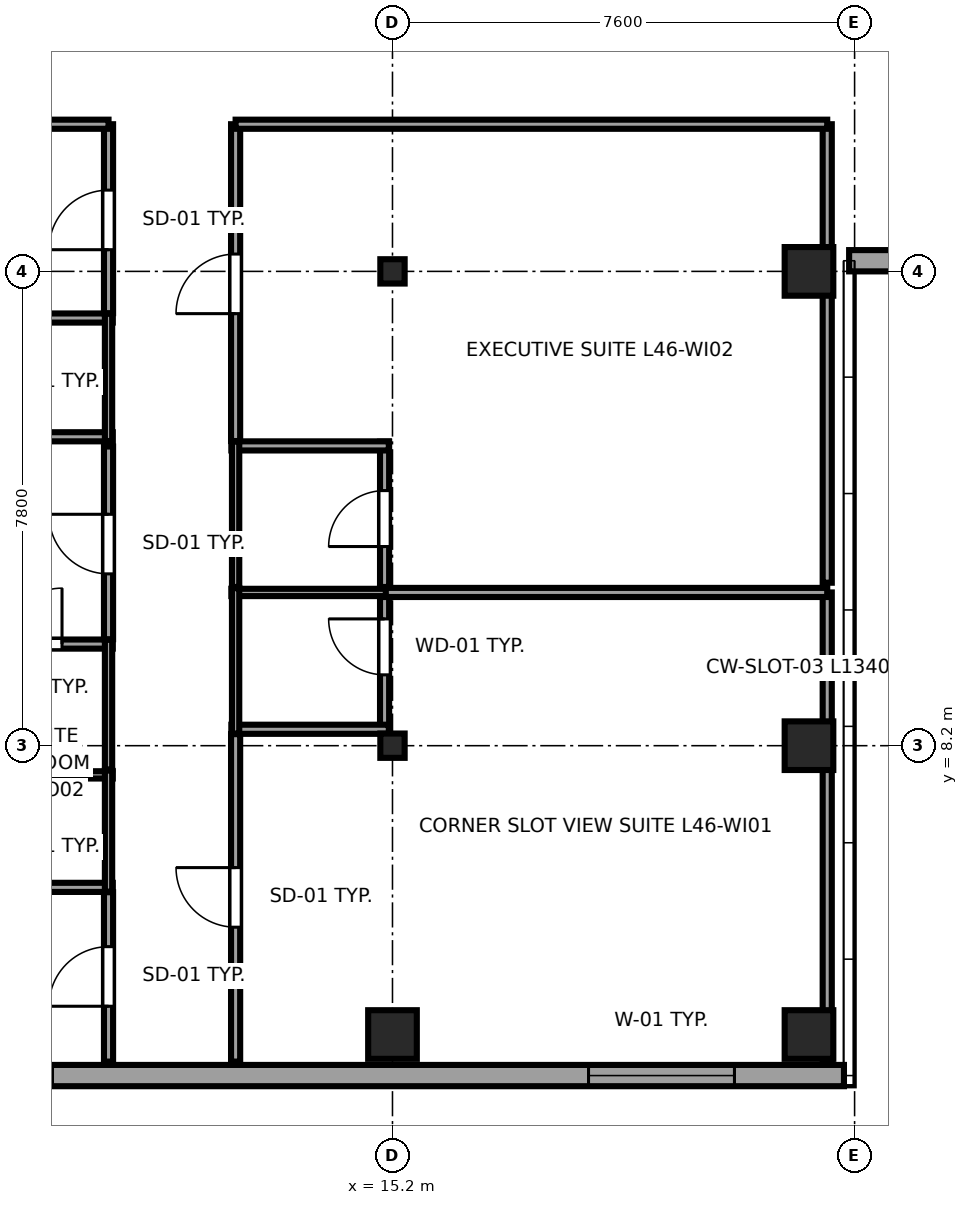
"""IFC4 building model, lengths in metres.
Left out: names, types, materials, properties, quantities, classifications, styles, units other than length and angle.
Written with IfcOpenShell. Run it as: python <this file> out.ifc"""

import sys

from ifc_helpers import new_model, si_unit, direction, frame, frame_2d, origin, origin_2d, place, context, subcontext, project, spatial, rectangle, i_section, extrude, source, transform, mapped, element, fill, save


model = new_model("IFC4")
c1 = context("Model", 3, precision=1e-05, world=origin(), true_north=direction((0.0, 1.0)))
c2 = subcontext(c1, "Body", "Model", "MODEL_VIEW")
j1 = project(units=[si_unit("LENGTHUNIT", "METRE"), si_unit("PLANEANGLEUNIT", "RADIAN")], contexts=[c1])
p1 = place(None, origin())
s1 = spatial("IfcSite", under=j1, at=p1, CompositionType="ELEMENT")
p2 = place(p1, origin())
s2 = spatial("IfcBuilding", under=s1, at=p2, CompositionType="ELEMENT")
p3 = place(p2, frame((0.0, 0.0, 175.45)))
s3 = spatial("IfcBuildingStorey", under=s2, at=p3, CompositionType="ELEMENT", Elevation=175.45)
m1 = source(origin(), c2, "Body", "SweptSolid", [
    extrude(rectangle(XDim=0.8, YDim=0.8, at=origin_2d()), origin(), (0.0, 0.0, 1.0), 3.55),
])
p4 = place(p3, frame((15.2, 3.45, 0.0), z_axis=(0.0, 0.0, 1.0), x_axis=(1.0, 0.0, 0.0)))
e1 = element("IfcColumn", 1, at=p4, inside=s3, PredefinedType="COLUMN", context=c2, shape_type="MappedRepresentation", body=[
    mapped(m1, transform((0.0, 0.0, 0.0), x_axis=(1.0, 0.0, 0.0), y_axis=(0.0, 1.0, 0.0), z_axis=(0.0, 0.0, 1.0), scale=1.0)),
])
m2 = source(origin(), c2, "Body", "SweptSolid", [
    extrude(i_section(OverallWidth=0.4, OverallDepth=0.4, WebThickness=0.02, FlangeThickness=0.035, at=origin_2d()), origin(), (0.0, 0.0, 1.0), 3.55),
])
for number, where, z_axis, x_axis in (
    (2, (15.2, 8.2, 0.0), (0.0, 0.0, 1.0), (1.0, 0.0, 0.0)),
    (3, (15.2, 16.0, 0.0), (0.0, 0.0, 1.0), (1.0, 0.0, 0.0)),
):
    element("IfcColumn", number, at=place(p3, frame(where, z_axis=z_axis, x_axis=x_axis)), inside=s3, PredefinedType="COLUMN", context=c2, shape_type="MappedRepresentation", body=[
        mapped(m2, transform((0.0, 0.0, 0.0), x_axis=(1.0, 0.0, 0.0), y_axis=(0.0, 1.0, 0.0), z_axis=(0.0, 0.0, 1.0), scale=1.0)),
    ])
for number, where, z_axis, x_axis in (
    (4, (22.05, 3.45, 0.0), (0.0, 0.0, 1.0), (1.0, 0.0, 0.0)),
    (5, (22.05, 8.2, 0.0), (0.0, 0.0, 1.0), (1.0, 0.0, 0.0)),
    (6, (22.05, 16.0, 0.0), (0.0, 0.0, 1.0), (1.0, 0.0, 0.0)),
):
    element("IfcColumn", number, at=place(p3, frame(where, z_axis=z_axis, x_axis=x_axis)), inside=s3, PredefinedType="COLUMN", context=c2, shape_type="MappedRepresentation", body=[
        mapped(m1, transform((0.0, 0.0, 0.0), x_axis=(1.0, 0.0, 0.0), y_axis=(0.0, 1.0, 0.0), z_axis=(0.0, 0.0, 1.0), scale=1.0)),
    ])
p5 = place(p3, frame((7.017, 2.775, 0.0), z_axis=(0.0, 0.0, 1.0), x_axis=(1.0, 0.0, 0.0)))
e7 = element("IfcWall", 7, at=p5, inside=s3, PredefinedType="SOLIDWALL", context=c2, shape_type="SweptSolid", body=[
    extrude(rectangle(XDim=15.608, YDim=0.35, at=frame_2d((7.804, 0.0))), origin(), (0.0, 0.0, 1.0), 3.37),
])
p6 = place(p5, frame((11.407, 0.0, 0.68)))
e8 = element("IfcOpeningElement", 8, at=p6, cuts=e7, PredefinedType="OPENING", context=c2, shape_type="SweptSolid", body=[
    extrude(rectangle(XDim=2.4, YDim=1.9, at=frame_2d((1.2, 0.95))), frame((0.0, 0.185, 0.0), z_axis=(0.0, -1.0, 0.0), x_axis=(1.0, 0.0, 0.0)), (0.0, 0.0, 1.0), 0.37),
])
p7 = place(p5, frame((1.091, 0.0, 0.62)))
e9 = element("IfcOpeningElement", 9, at=p7, cuts=e7, PredefinedType="OPENING", context=c2, shape_type="SweptSolid", body=[
    extrude(rectangle(XDim=1.5, YDim=1.55, at=frame_2d((0.75, 0.775))), frame((0.0, 0.185, 0.0), z_axis=(0.0, -1.0, 0.0), x_axis=(1.0, 0.0, 0.0)), (0.0, 0.0, 1.0), 0.37),
])
p8 = place(p3, frame((22.71, 16.175, 0.0), z_axis=(0.0, 0.0, 1.0), x_axis=(1.0, 0.0, 0.0)))
e10 = element("IfcWall", 10, at=p8, inside=s3, PredefinedType="SOLIDWALL", context=c2, shape_type="SweptSolid", body=[
    extrude(rectangle(XDim=11.58, YDim=0.35, at=frame_2d((5.79, 0.0))), origin(), (0.0, 0.0, 1.0), 2.758),
])
p9 = place(p8, frame((1.995, 0.0, 0.68)))
e11 = element("IfcOpeningElement", 11, at=p9, cuts=e10, PredefinedType="OPENING", context=c2, shape_type="SweptSolid", body=[
    extrude(rectangle(XDim=2.4, YDim=1.9, at=frame_2d((1.2, 0.95))), frame((0.0, 0.185, 0.0), z_axis=(0.0, -1.0, 0.0), x_axis=(1.0, 0.0, 0.0)), (0.0, 0.0, 1.0), 0.37),
])
p10 = place(p8, frame((7.185, 0.0, 0.68)))
e12 = element("IfcOpeningElement", 12, at=p10, cuts=e10, PredefinedType="OPENING", context=c2, shape_type="SweptSolid", body=[
    extrude(rectangle(XDim=2.4, YDim=1.9, at=frame_2d((1.2, 0.95))), frame((0.0, 0.185, 0.0), z_axis=(0.0, -1.0, 0.0), x_axis=(1.0, 0.0, 0.0)), (0.0, 0.0, 1.0), 0.37),
])
p11 = place(p3, frame((8.01, 5.87, 0.0), z_axis=(0.0, 0.0, 1.0), x_axis=(1.0, 0.0, 0.0)))
e13 = element("IfcWall", 13, at=p11, inside=s3, PredefinedType="PARTITIONING", context=c2, shape_type="SweptSolid", body=[
    extrude(rectangle(XDim=2.59, YDim=0.15, at=frame_2d((1.295, 0.0))), origin(), (0.0, 0.0, 1.0), 3.37),
])
p12 = place(p3, frame((8.01, 7.72, 0.0), z_axis=(0.0, 0.0, 1.0), x_axis=(1.0, 0.0, 0.0)))
e14 = element("IfcWall", 14, at=p12, inside=s3, PredefinedType="PLUMBINGWALL", context=c2, shape_type="SweptSolid", body=[
    extrude(rectangle(XDim=2.59, YDim=0.12, at=frame_2d((1.295, 0.0))), origin(), (0.0, 0.0, 1.0), 3.37),
])
p13 = place(p3, frame((10.53, 5.8, 0.0), z_axis=(0.0, 0.0, 1.0), x_axis=(0.0, 1.0, 0.0)))
e15 = element("IfcWall", 15, at=p13, inside=s3, PredefinedType="PLUMBINGWALL", context=c2, shape_type="SweptSolid", body=[
    extrude(rectangle(XDim=1.99, YDim=0.12, at=frame_2d((0.995, 0.0))), origin(), (0.0, 0.0, 1.0), 3.37),
])
p14 = place(p3, frame((8.01, 9.871, 0.0), z_axis=(0.0, 0.0, 1.0), x_axis=(1.0, 0.0, 0.0)))
e16 = element("IfcWall", 16, at=p14, inside=s3, PredefinedType="PARTITIONING", context=c2, shape_type="SweptSolid", body=[
    extrude(rectangle(XDim=2.59, YDim=0.15, at=frame_2d((1.295, 0.0))), origin(), (0.0, 0.0, 1.0), 3.37),
])
p15 = place(p14, frame((0.835, 0.0, 0.0)))
e17 = element("IfcOpeningElement", 17, at=p15, cuts=e16, PredefinedType="OPENING", context=c2, shape_type="SweptSolid", body=[
    extrude(rectangle(XDim=0.92, YDim=2.01, at=frame_2d((0.46, 1.005))), frame((0.0, 0.085, 0.0), z_axis=(0.0, -1.0, 0.0), x_axis=(1.0, 0.0, 0.0)), (0.0, 0.0, 1.0), 0.17),
])
p16 = place(p3, frame((10.53, 7.81, 0.0), z_axis=(0.0, 0.0, 1.0), x_axis=(0.0, 1.0, 0.0)))
e18 = element("IfcWall", 18, at=p16, inside=s3, PredefinedType="PLUMBINGWALL", context=c2, shape_type="SweptSolid", body=[
    extrude(rectangle(XDim=2.131, YDim=0.12, at=frame_2d((1.065, 0.0))), origin(), (0.0, 0.0, 1.0), 3.37),
])
p17 = place(p3, frame((3.005, 13.28, 0.0), z_axis=(0.0, 0.0, 1.0), x_axis=(1.0, 0.0, 0.0)))
e19 = element("IfcWall", 19, at=p17, inside=s3, PredefinedType="PARTITIONING", context=c2, shape_type="SweptSolid", body=[
    extrude(rectangle(XDim=7.595, YDim=0.15, at=frame_2d((3.798, 0.0))), origin(), (0.0, 0.0, 1.0), 3.37),
])
p18 = place(p3, frame((8.01, 15.233, 0.0), z_axis=(0.0, 0.0, 1.0), x_axis=(1.0, 0.0, 0.0)))
e20 = element("IfcWall", 20, at=p18, inside=s3, PredefinedType="PARTITIONING", context=c2, shape_type="SweptSolid", body=[
    extrude(rectangle(XDim=2.59, YDim=0.15, at=frame_2d((1.295, 0.0))), origin(), (0.0, 0.0, 1.0), 3.37),
])
p19 = place(p3, frame((10.53, 13.21, 0.0), z_axis=(0.0, 0.0, 1.0), x_axis=(0.0, 1.0, 0.0)))
e21 = element("IfcWall", 21, at=p19, inside=s3, PredefinedType="PLUMBINGWALL", context=c2, shape_type="SweptSolid", body=[
    extrude(rectangle(XDim=2.093, YDim=0.12, at=frame_2d((1.046, 0.0))), origin(), (0.0, 0.0, 1.0), 3.37),
])
p20 = place(p3, frame((15.07, 8.4, 0.0), z_axis=(0.0, 0.0, 1.0), x_axis=(0.0, 1.0, 0.0)))
e22 = element("IfcWall", 22, at=p20, inside=s3, PredefinedType="PARTITIONING", context=c2, shape_type="SweptSolid", body=[
    extrude(rectangle(XDim=2.39, YDim=0.15, at=frame_2d((1.195, 0.0))), origin(), (0.0, 0.0, 1.0), 2.827),
])
p21 = place(p20, frame((0.965, 0.0, 0.0)))
e23 = element("IfcOpeningElement", 23, at=p21, cuts=e22, PredefinedType="OPENING", context=c2, shape_type="SweptSolid", body=[
    extrude(rectangle(XDim=0.92, YDim=2.01, at=frame_2d((0.46, 1.005))), frame((0.0, 0.085, 0.0), z_axis=(0.0, -1.0, 0.0), x_axis=(1.0, 0.0, 0.0)), (0.0, 0.0, 1.0), 0.17),
])
p22 = place(p3, frame((12.55, 8.47, 0.0), z_axis=(0.0, 0.0, 1.0), x_axis=(1.0, 0.0, 0.0)))
e24 = element("IfcWall", 24, at=p22, inside=s3, PredefinedType="PARTITIONING", context=c2, shape_type="SweptSolid", body=[
    extrude(rectangle(XDim=2.59, YDim=0.15, at=frame_2d((1.295, 0.0))), origin(), (0.0, 0.0, 1.0), 3.37),
])
p23 = place(p3, frame((12.55, 10.72, 0.0), z_axis=(0.0, 0.0, 1.0), x_axis=(1.0, 0.0, 0.0)))
e25 = element("IfcWall", 25, at=p23, inside=s3, PredefinedType="PLUMBINGWALL", context=c2, shape_type="SweptSolid", body=[
    extrude(rectangle(XDim=2.59, YDim=0.12, at=frame_2d((1.295, 0.0))), origin(), (0.0, 0.0, 1.0), 3.37),
])
p24 = place(p3, frame((12.62, 8.4, 0.0), z_axis=(0.0, 0.0, 1.0), x_axis=(0.0, 1.0, 0.0)))
e26 = element("IfcWall", 26, at=p24, inside=s3, PredefinedType="PLUMBINGWALL", context=c2, shape_type="SweptSolid", body=[
    extrude(rectangle(XDim=2.39, YDim=0.12, at=frame_2d((1.195, 0.0))), origin(), (0.0, 0.0, 1.0), 3.37),
])
p25 = place(p3, frame((15.07, 10.81, 0.0), z_axis=(0.0, 0.0, 1.0), x_axis=(0.0, 1.0, 0.0)))
e27 = element("IfcWall", 27, at=p25, inside=s3, PredefinedType="PARTITIONING", context=c2, shape_type="SweptSolid", body=[
    extrude(rectangle(XDim=2.39, YDim=0.15, at=frame_2d((1.195, 0.0))), origin(), (0.0, 0.0, 1.0), 2.827),
])
p26 = place(p25, frame((0.665, 0.0, 0.0)))
e28 = element("IfcOpeningElement", 28, at=p26, cuts=e27, PredefinedType="OPENING", context=c2, shape_type="SweptSolid", body=[
    extrude(rectangle(XDim=0.92, YDim=2.01, at=frame_2d((0.46, 1.005))), frame((0.0, 0.085, 0.0), z_axis=(0.0, -1.0, 0.0), x_axis=(1.0, 0.0, 0.0)), (0.0, 0.0, 1.0), 0.17),
])
p27 = place(p3, frame((12.55, 13.13, 0.0), z_axis=(0.0, 0.0, 1.0), x_axis=(1.0, 0.0, 0.0)))
e29 = element("IfcWall", 29, at=p27, inside=s3, PredefinedType="PARTITIONING", context=c2, shape_type="SweptSolid", body=[
    extrude(rectangle(XDim=2.59, YDim=0.15, at=frame_2d((1.295, 0.0))), origin(), (0.0, 0.0, 1.0), 3.37),
])
p28 = place(p3, frame((12.62, 10.81, 0.0), z_axis=(0.0, 0.0, 1.0), x_axis=(0.0, 1.0, 0.0)))
e30 = element("IfcWall", 30, at=p28, inside=s3, PredefinedType="PLUMBINGWALL", context=c2, shape_type="SweptSolid", body=[
    extrude(rectangle(XDim=2.39, YDim=0.12, at=frame_2d((1.195, 0.0))), origin(), (0.0, 0.0, 1.0), 3.37),
])
p29 = place(p3, frame((10.53, 3.005, 0.0), z_axis=(0.0, 0.0, 1.0), x_axis=(0.0, 1.0, 0.0)))
e31 = element("IfcWall", 31, at=p29, inside=s3, PredefinedType="PARTITIONING", context=c2, shape_type="SweptSolid", body=[
    extrude(rectangle(XDim=2.785, YDim=0.15, at=frame_2d((1.393, 0.0))), origin(), (0.0, 0.0, 1.0), 3.37),
])
p30 = place(p29, frame((0.91, 0.0, 0.0)))
e32 = element("IfcOpeningElement", 32, at=p30, cuts=e31, PredefinedType="OPENING", context=c2, shape_type="SweptSolid", body=[
    extrude(rectangle(XDim=0.98, YDim=2.12, at=frame_2d((0.49, 1.06))), frame((0.0, 0.085, 0.0), z_axis=(0.0, -1.0, 0.0), x_axis=(1.0, 0.0, 0.0)), (0.0, 0.0, 1.0), 0.17),
])
p31 = place(p3, frame((10.53, 9.951, 0.0), z_axis=(0.0, 0.0, 1.0), x_axis=(0.0, 1.0, 0.0)))
e33 = element("IfcWall", 33, at=p31, inside=s3, PredefinedType="PARTITIONING", context=c2, shape_type="SweptSolid", body=[
    extrude(rectangle(XDim=3.169, YDim=0.15, at=frame_2d((1.584, 0.0))), origin(), (0.0, 0.0, 1.0), 3.37),
])
p32 = place(p31, frame((1.074, 0.0, 0.0)))
e34 = element("IfcOpeningElement", 34, at=p32, cuts=e33, PredefinedType="OPENING", context=c2, shape_type="SweptSolid", body=[
    extrude(rectangle(XDim=0.98, YDim=2.12, at=frame_2d((0.49, 1.06))), frame((0.0, 0.085, 0.0), z_axis=(0.0, -1.0, 0.0), x_axis=(1.0, 0.0, 0.0)), (0.0, 0.0, 1.0), 0.17),
])
p33 = place(p3, frame((10.53, 15.313, 0.0), z_axis=(0.0, 0.0, 1.0), x_axis=(0.0, 1.0, 0.0)))
e35 = element("IfcWall", 35, at=p33, inside=s3, PredefinedType="PARTITIONING", context=c2, shape_type="SweptSolid", body=[
    extrude(rectangle(XDim=3.107, YDim=0.15, at=frame_2d((1.553, 0.0))), origin(), (0.0, 0.0, 1.0), 3.37),
])
p34 = place(p33, frame((1.043, 0.0, 0.0)))
e36 = element("IfcOpeningElement", 36, at=p34, cuts=e35, PredefinedType="OPENING", context=c2, shape_type="SweptSolid", body=[
    extrude(rectangle(XDim=0.98, YDim=2.12, at=frame_2d((0.49, 1.06))), frame((0.0, 0.085, 0.0), z_axis=(0.0, -1.0, 0.0), x_axis=(1.0, 0.0, 0.0)), (0.0, 0.0, 1.0), 0.17),
])
p35 = place(p3, frame((3.005, 18.42, 0.0), z_axis=(0.0, 0.0, 1.0), x_axis=(1.0, 0.0, 0.0)))
e37 = element("IfcWall", 37, at=p35, inside=s3, PredefinedType="PARTITIONING", context=c2, shape_type="SweptSolid", body=[
    extrude(rectangle(XDim=7.525, YDim=0.15, at=frame_2d((3.763, 0.0))), origin(), (0.0, 0.0, 1.0), 3.37),
])
p36 = place(p3, frame((12.62, 3.005, 0.0), z_axis=(0.0, 0.0, 1.0), x_axis=(0.0, 1.0, 0.0)))
e38 = element("IfcWall", 38, at=p36, inside=s3, PredefinedType="PARTITIONING", context=c2, shape_type="SweptSolid", body=[
    extrude(rectangle(XDim=5.385, YDim=0.15, at=frame_2d((2.692, 0.0))), origin(), (0.0, 0.0, 1.0), 3.37),
])
p37 = place(p36, frame((2.21, 0.0, 0.0)))
e39 = element("IfcOpeningElement", 39, at=p37, cuts=e38, PredefinedType="OPENING", context=c2, shape_type="SweptSolid", body=[
    extrude(rectangle(XDim=0.98, YDim=2.12, at=frame_2d((0.49, 1.06))), frame((0.0, 0.085, 0.0), z_axis=(0.0, -1.0, 0.0), x_axis=(1.0, 0.0, 0.0)), (0.0, 0.0, 1.0), 0.17),
])
p38 = place(p3, frame((22.35, 3.005, 0.0), z_axis=(0.0, 0.0, 1.0), x_axis=(0.0, 1.0, 0.0)))
e40 = element("IfcWall", 40, at=p38, inside=s3, PredefinedType="PARTITIONING", context=c2, shape_type="SweptSolid", body=[
    extrude(rectangle(XDim=7.715, YDim=0.15, at=frame_2d((3.857, 0.0))), origin(), (0.0, 0.0, 1.0), 3.37),
])
p39 = place(p3, frame((15.09, 10.72, 0.0), z_axis=(0.0, 0.0, 1.0), x_axis=(1.0, 0.0, 0.0)))
e41 = element("IfcWall", 41, at=p39, inside=s3, PredefinedType="PARTITIONING", context=c2, shape_type="SweptSolid", body=[
    extrude(rectangle(XDim=7.26, YDim=0.15, at=frame_2d((3.63, 0.0))), origin(), (0.0, 0.0, 1.0), 3.37),
])
p40 = place(p3, frame((12.62, 13.21, 0.0), z_axis=(0.0, 0.0, 1.0), x_axis=(0.0, 1.0, 0.0)))
e42 = element("IfcWall", 42, at=p40, inside=s3, PredefinedType="PARTITIONING", context=c2, shape_type="SweptSolid", body=[
    extrude(rectangle(XDim=5.21, YDim=0.15, at=frame_2d((2.605, 0.0))), origin(), (0.0, 0.0, 1.0), 3.37),
])
p41 = place(p40, frame((2.095, 0.0, 0.0)))
e43 = element("IfcOpeningElement", 43, at=p41, cuts=e42, PredefinedType="OPENING", context=c2, shape_type="SweptSolid", body=[
    extrude(rectangle(XDim=0.98, YDim=2.12, at=frame_2d((0.49, 1.06))), frame((0.0, 0.085, 0.0), z_axis=(0.0, -1.0, 0.0), x_axis=(1.0, 0.0, 0.0)), (0.0, 0.0, 1.0), 0.17),
])
p42 = place(p3, frame((22.35, 10.88, 0.0), z_axis=(0.0, 0.0, 1.0), x_axis=(0.0, 1.0, 0.0)))
e44 = element("IfcWall", 44, at=p42, inside=s3, PredefinedType="PARTITIONING", context=c2, shape_type="SweptSolid", body=[
    extrude(rectangle(XDim=7.54, YDim=0.15, at=frame_2d((3.77, 0.0))), origin(), (0.0, 0.0, 1.0), 3.37),
])
p43 = place(p3, frame((12.62, 18.42, 0.0), z_axis=(0.0, 0.0, 1.0), x_axis=(1.0, 0.0, 0.0)))
e45 = element("IfcWall", 45, at=p43, inside=s3, PredefinedType="PARTITIONING", context=c2, shape_type="SweptSolid", body=[
    extrude(rectangle(XDim=9.73, YDim=0.15, at=frame_2d((4.865, 0.0))), origin(), (0.0, 0.0, 1.0), 3.37),
])
m3 = source(origin(), c2, "Body", "SweptSolid", [
    extrude(rectangle(XDim=2.4, YDim=1.9, at=frame_2d((1.2, 0.95))), frame((0.0, 0.09, 0.0), z_axis=(0.0, -1.0, 0.0), x_axis=(1.0, 0.0, 0.0)), (0.0, 0.0, 1.0), 0.06),
])
p44 = place(p6, origin())
e46 = element("IfcWindow", 46, at=p44, inside=s3, PartitioningType="TRIPLE_PANEL_HORIZONTAL", PredefinedType="WINDOW", context=c2, shape_type="MappedRepresentation", body=[
    mapped(m3, transform((0.0, 0.0, 0.0), x_axis=(1.0, 0.0, 0.0), y_axis=(0.0, 1.0, 0.0), z_axis=(0.0, 0.0, 1.0), scale=1.0)),
])
fill(e8, e46)
m4 = source(origin(), c2, "Body", "SweptSolid", [
    extrude(rectangle(XDim=1.5, YDim=1.55, at=frame_2d((0.75, 0.775))), frame((0.0, 0.09, 0.0), z_axis=(0.0, -1.0, 0.0), x_axis=(1.0, 0.0, 0.0)), (0.0, 0.0, 1.0), 0.06),
])
p45 = place(p7, origin())
e47 = element("IfcWindow", 47, at=p45, inside=s3, PartitioningType="SINGLE_PANEL", PredefinedType="WINDOW", context=c2, shape_type="MappedRepresentation", body=[
    mapped(m4, transform((0.0, 0.0, 0.0), x_axis=(1.0, 0.0, 0.0), y_axis=(0.0, 1.0, 0.0), z_axis=(0.0, 0.0, 1.0), scale=1.0)),
])
fill(e9, e47)
m5 = source(origin(), c2, "Body", "SweptSolid", [
    extrude(rectangle(XDim=0.92, YDim=2.01, at=frame_2d((0.46, 1.005))), frame((0.0, 0.025, 0.0), z_axis=(0.0, -1.0, 0.0), x_axis=(1.0, 0.0, 0.0)), (0.0, 0.0, 1.0), 0.05),
])
p46 = place(p15, origin())
e48 = element("IfcDoor", 48, at=p46, inside=s3, OperationType="SINGLE_SWING_RIGHT", PredefinedType="DOOR", context=c2, shape_type="MappedRepresentation", body=[
    mapped(m5, transform((0.0, 0.0, 0.0), x_axis=(1.0, 0.0, 0.0), y_axis=(0.0, 1.0, 0.0), z_axis=(0.0, 0.0, 1.0), scale=1.0)),
])
fill(e17, e48)
p47 = place(p21, origin())
e49 = element("IfcDoor", 49, at=p47, inside=s3, OperationType="SINGLE_SWING_RIGHT", PredefinedType="DOOR", context=c2, shape_type="MappedRepresentation", body=[
    mapped(m5, transform((0.0, 0.0, 0.0), x_axis=(1.0, 0.0, 0.0), y_axis=(0.0, 1.0, 0.0), z_axis=(0.0, 0.0, 1.0), scale=1.0)),
])
fill(e23, e49)
p48 = place(p26, origin())
e50 = element("IfcDoor", 50, at=p48, inside=s3, OperationType="SINGLE_SWING_LEFT", PredefinedType="DOOR", context=c2, shape_type="MappedRepresentation", body=[
    mapped(m5, transform((0.0, 0.0, 0.0), x_axis=(1.0, 0.0, 0.0), y_axis=(0.0, 1.0, 0.0), z_axis=(0.0, 0.0, 1.0), scale=1.0)),
])
fill(e28, e50)
m6 = source(origin(), c2, "Body", "SweptSolid", [
    extrude(rectangle(XDim=0.98, YDim=2.12, at=frame_2d((0.49, 1.06))), frame((0.0, 0.025, 0.0), z_axis=(0.0, -1.0, 0.0), x_axis=(1.0, 0.0, 0.0)), (0.0, 0.0, 1.0), 0.05),
])
p49 = place(p30, origin())
e51 = element("IfcDoor", 51, at=p49, inside=s3, OperationType="SINGLE_SWING_LEFT", PredefinedType="DOOR", context=c2, shape_type="MappedRepresentation", body=[
    mapped(m6, transform((0.0, 0.0, 0.0), x_axis=(1.0, 0.0, 0.0), y_axis=(0.0, 1.0, 0.0), z_axis=(0.0, 0.0, 1.0), scale=1.0)),
])
fill(e32, e51)
p50 = place(p32, origin())
e52 = element("IfcDoor", 52, at=p50, inside=s3, OperationType="SINGLE_SWING_RIGHT", PredefinedType="DOOR", context=c2, shape_type="MappedRepresentation", body=[
    mapped(m6, transform((0.0, 0.0, 0.0), x_axis=(1.0, 0.0, 0.0), y_axis=(0.0, 1.0, 0.0), z_axis=(0.0, 0.0, 1.0), scale=1.0)),
])
fill(e34, e52)
p51 = place(p34, origin())
e53 = element("IfcDoor", 53, at=p51, inside=s3, OperationType="SINGLE_SWING_LEFT", PredefinedType="DOOR", context=c2, shape_type="MappedRepresentation", body=[
    mapped(m6, transform((0.0, 0.0, 0.0), x_axis=(1.0, 0.0, 0.0), y_axis=(0.0, 1.0, 0.0), z_axis=(0.0, 0.0, 1.0), scale=1.0)),
])
fill(e36, e53)
p52 = place(p37, origin())
e54 = element("IfcDoor", 54, at=p52, inside=s3, OperationType="SINGLE_SWING_RIGHT", PredefinedType="DOOR", context=c2, shape_type="MappedRepresentation", body=[
    mapped(m6, transform((0.0, 0.0, 0.0), x_axis=(1.0, 0.0, 0.0), y_axis=(0.0, 1.0, 0.0), z_axis=(0.0, 0.0, 1.0), scale=1.0)),
])
fill(e39, e54)
p53 = place(p41, origin())
e55 = element("IfcDoor", 55, at=p53, inside=s3, OperationType="SINGLE_SWING_LEFT", PredefinedType="DOOR", context=c2, shape_type="MappedRepresentation", body=[
    mapped(m6, transform((0.0, 0.0, 0.0), x_axis=(1.0, 0.0, 0.0), y_axis=(0.0, 1.0, 0.0), z_axis=(0.0, 0.0, 1.0), scale=1.0)),
])
fill(e43, e55)
save(model, sys.argv[1])
